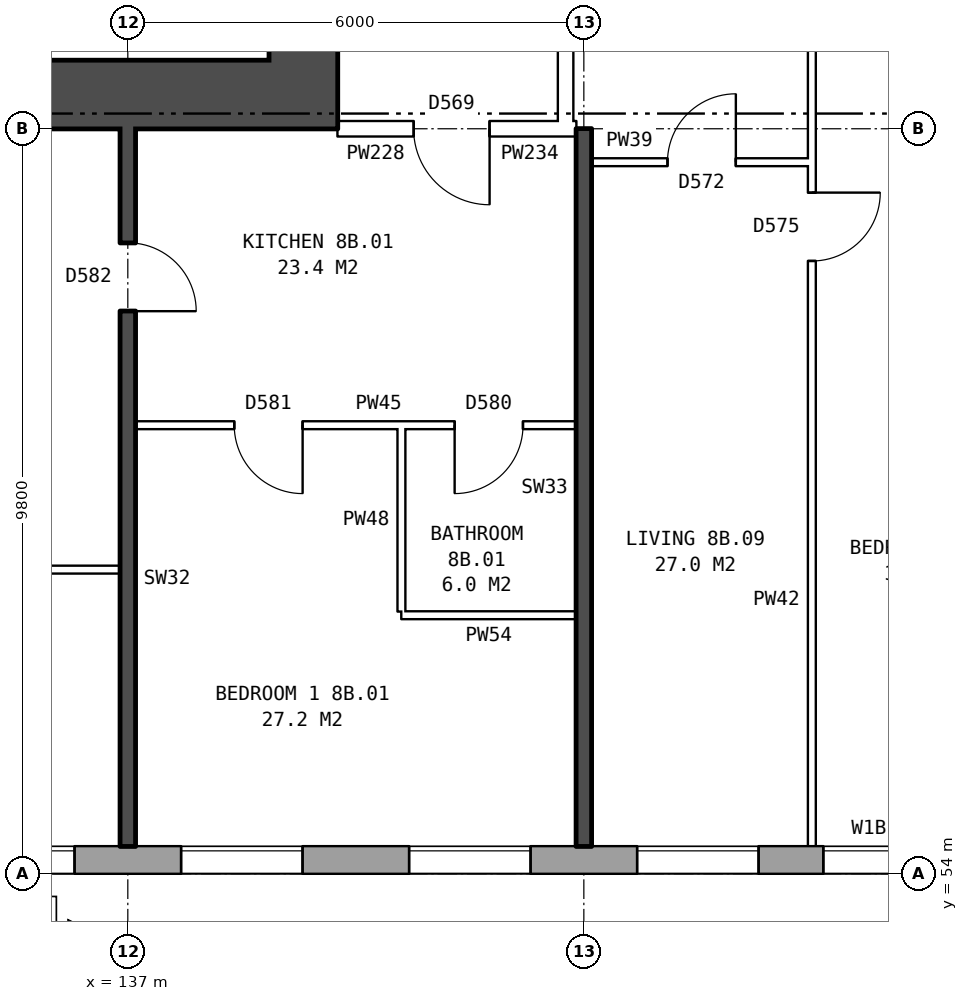
"""IFC4 building model, lengths in metres.
Left out: names, types, materials, properties, quantities, classifications, styles, units other than length and angle.
Written with IfcOpenShell. Run it as: python <this file> out.ifc"""

import sys

from ifc_helpers import new_model, si_unit, direction, frame, frame_2d, origin, place, context, subcontext, project, spatial, rectangle, extrude, element, fill, save


model = new_model("IFC4")
c1 = context("Model", 3, precision=1e-05, world=origin(), true_north=direction((0.0, 1.0)))
c2 = subcontext(c1, "Body", "Model", "MODEL_VIEW")
j1 = project(units=[si_unit("LENGTHUNIT", "METRE"), si_unit("PLANEANGLEUNIT", "RADIAN")], contexts=[c1])
p1 = place(None, origin())
s1 = spatial("IfcSite", under=j1, at=p1, CompositionType="ELEMENT")
p2 = place(p1, origin())
s2 = spatial("IfcBuilding", under=s1, at=p2, CompositionType="ELEMENT")
p3 = place(p2, frame((0.0, 0.0, 31.9)))
s3 = spatial("IfcBuildingStorey", under=s2, at=p3, CompositionType="ELEMENT", Elevation=31.9)
p4 = place(p3, frame((134.075, 54.18, 0.0), z_axis=(0.0, 0.0, 1.0), x_axis=(1.0, 0.0, 0.0)))
e1 = element("IfcWall", 1, at=p4, inside=s3, PredefinedType="STANDARD", context=c2, shape_type="SweptSolid", body=[
    extrude(rectangle(XDim=40.601, YDim=0.36, at=frame_2d((20.3, 0.0))), origin(), (0.0, 0.0, 1.0), 2.85),
])
p5 = place(p4, frame((0.625, 0.0, 0.8)))
e2 = element("IfcOpeningElement", 2, at=p5, cuts=e1, PredefinedType="OPENING", context=c2, shape_type="SweptSolid", body=[
    extrude(rectangle(XDim=1.6, YDim=1.8, at=frame_2d((0.8, 0.9))), frame((0.0, 0.19, 0.0), z_axis=(0.0, -1.0, 0.0), x_axis=(1.0, 0.0, 0.0)), (0.0, 0.0, 1.0), 0.38),
])
p6 = place(p4, frame((3.625, 0.0, 0.8)))
e3 = element("IfcOpeningElement", 3, at=p6, cuts=e1, PredefinedType="OPENING", context=c2, shape_type="SweptSolid", body=[
    extrude(rectangle(XDim=1.6, YDim=1.8, at=frame_2d((0.8, 0.9))), frame((0.0, 0.19, 0.0), z_axis=(0.0, -1.0, 0.0), x_axis=(1.0, 0.0, 0.0)), (0.0, 0.0, 1.0), 0.38),
])
p7 = place(p4, frame((6.625, 0.0, 0.8)))
e4 = element("IfcOpeningElement", 4, at=p7, cuts=e1, PredefinedType="OPENING", context=c2, shape_type="SweptSolid", body=[
    extrude(rectangle(XDim=1.6, YDim=1.8, at=frame_2d((0.8, 0.9))), frame((0.0, 0.19, 0.0), z_axis=(0.0, -1.0, 0.0), x_axis=(1.0, 0.0, 0.0)), (0.0, 0.0, 1.0), 0.38),
])
p8 = place(p4, frame((9.625, 0.0, 0.8)))
e5 = element("IfcOpeningElement", 5, at=p8, cuts=e1, PredefinedType="OPENING", context=c2, shape_type="SweptSolid", body=[
    extrude(rectangle(XDim=1.6, YDim=1.8, at=frame_2d((0.8, 0.9))), frame((0.0, 0.19, 0.0), z_axis=(0.0, -1.0, 0.0), x_axis=(1.0, 0.0, 0.0)), (0.0, 0.0, 1.0), 0.38),
])
p9 = place(p4, frame((12.075, 0.0, 0.8)))
e6 = element("IfcOpeningElement", 6, at=p9, cuts=e1, PredefinedType="OPENING", context=c2, shape_type="SweptSolid", body=[
    extrude(rectangle(XDim=1.2, YDim=1.8, at=frame_2d((0.6, 0.9))), frame((0.0, 0.19, 0.0), z_axis=(0.0, -1.0, 0.0), x_axis=(1.0, 0.0, 0.0)), (0.0, 0.0, 1.0), 0.38),
])
p10 = place(p4, frame((15.575, 0.0, 0.65)))
e7 = element("IfcOpeningElement", 7, at=p10, cuts=e1, PredefinedType="OPENING", context=c2, shape_type="SweptSolid", body=[
    extrude(rectangle(XDim=0.8, YDim=0.9, at=frame_2d((0.4, 0.45))), frame((0.0, 0.19, 0.0), z_axis=(0.0, -1.0, 0.0), x_axis=(1.0, 0.0, 0.0)), (0.0, 0.0, 1.0), 0.38),
])
p11 = place(p4, frame((18.625, 0.0, 0.8)))
e8 = element("IfcOpeningElement", 8, at=p11, cuts=e1, PredefinedType="OPENING", context=c2, shape_type="SweptSolid", body=[
    extrude(rectangle(XDim=1.6, YDim=1.8, at=frame_2d((0.8, 0.9))), frame((0.0, 0.19, 0.0), z_axis=(0.0, -1.0, 0.0), x_axis=(1.0, 0.0, 0.0)), (0.0, 0.0, 1.0), 0.38),
])
p12 = place(p4, frame((21.625, 0.0, 0.8)))
e9 = element("IfcOpeningElement", 9, at=p12, cuts=e1, PredefinedType="OPENING", context=c2, shape_type="SweptSolid", body=[
    extrude(rectangle(XDim=1.6, YDim=1.8, at=frame_2d((0.8, 0.9))), frame((0.0, 0.19, 0.0), z_axis=(0.0, -1.0, 0.0), x_axis=(1.0, 0.0, 0.0)), (0.0, 0.0, 1.0), 0.38),
])
p13 = place(p4, frame((23.525, 0.0, 0.8)))
e10 = element("IfcOpeningElement", 10, at=p13, cuts=e1, PredefinedType="OPENING", context=c2, shape_type="SweptSolid", body=[
    extrude(rectangle(XDim=1.2, YDim=0.9, at=frame_2d((0.6, 0.45))), frame((0.0, 0.19, 0.0), z_axis=(0.0, -1.0, 0.0), x_axis=(1.0, 0.0, 0.0)), (0.0, 0.0, 1.0), 0.38),
])
p14 = place(p4, frame((27.625, 0.0, 0.8)))
e11 = element("IfcOpeningElement", 11, at=p14, cuts=e1, PredefinedType="OPENING", context=c2, shape_type="SweptSolid", body=[
    extrude(rectangle(XDim=1.6, YDim=1.8, at=frame_2d((0.8, 0.9))), frame((0.0, 0.19, 0.0), z_axis=(0.0, -1.0, 0.0), x_axis=(1.0, 0.0, 0.0)), (0.0, 0.0, 1.0), 0.38),
])
p15 = place(p4, frame((30.625, 0.0, 0.8)))
e12 = element("IfcOpeningElement", 12, at=p15, cuts=e1, PredefinedType="OPENING", context=c2, shape_type="SweptSolid", body=[
    extrude(rectangle(XDim=1.6, YDim=1.8, at=frame_2d((0.8, 0.9))), frame((0.0, 0.19, 0.0), z_axis=(0.0, -1.0, 0.0), x_axis=(1.0, 0.0, 0.0)), (0.0, 0.0, 1.0), 0.38),
])
p16 = place(p4, frame((33.625, 0.0, 0.8)))
e13 = element("IfcOpeningElement", 13, at=p16, cuts=e1, PredefinedType="OPENING", context=c2, shape_type="SweptSolid", body=[
    extrude(rectangle(XDim=1.6, YDim=1.8, at=frame_2d((0.8, 0.9))), frame((0.0, 0.19, 0.0), z_axis=(0.0, -1.0, 0.0), x_axis=(1.0, 0.0, 0.0)), (0.0, 0.0, 1.0), 0.38),
])
p17 = place(p4, frame((36.625, 0.0, 0.8)))
e14 = element("IfcOpeningElement", 14, at=p17, cuts=e1, PredefinedType="OPENING", context=c2, shape_type="SweptSolid", body=[
    extrude(rectangle(XDim=1.6, YDim=1.8, at=frame_2d((0.8, 0.9))), frame((0.0, 0.19, 0.0), z_axis=(0.0, -1.0, 0.0), x_axis=(1.0, 0.0, 0.0)), (0.0, 0.0, 1.0), 0.38),
])
p18 = place(p4, frame((13.575, 0.0, 1.4)))
e15 = element("IfcOpeningElement", 15, at=p18, cuts=e1, PredefinedType="OPENING", context=c2, shape_type="SweptSolid", body=[
    extrude(rectangle(XDim=0.6, YDim=1.2, at=frame_2d((0.3, 0.6))), frame((0.0, 0.19, 0.0), z_axis=(0.0, -1.0, 0.0), x_axis=(1.0, 0.0, 0.0)), (0.0, 0.0, 1.0), 0.38),
])
p19 = place(p4, frame((16.725, 0.0, 0.65)))
e16 = element("IfcOpeningElement", 16, at=p19, cuts=e1, PredefinedType="OPENING", context=c2, shape_type="SweptSolid", body=[
    extrude(rectangle(XDim=1.0, YDim=1.8, at=frame_2d((0.5, 0.9))), frame((0.0, 0.19, 0.0), z_axis=(0.0, -1.0, 0.0), x_axis=(1.0, 0.0, 0.0)), (0.0, 0.0, 1.0), 0.38),
])
p20 = place(p4, frame((26.075, 0.0, 1.7)))
e17 = element("IfcOpeningElement", 17, at=p20, cuts=e1, PredefinedType="OPENING", context=c2, shape_type="SweptSolid", body=[
    extrude(rectangle(XDim=0.6, YDim=0.9, at=frame_2d((0.3, 0.45))), frame((0.0, 0.19, 0.0), z_axis=(0.0, -1.0, 0.0), x_axis=(1.0, 0.0, 0.0)), (0.0, 0.0, 1.0), 0.38),
])
p21 = place(p3, frame((139.31, 64.7, 0.0), z_axis=(0.0, 0.0, 1.0), x_axis=(0.0, 1.0, 0.0)))
e18 = element("IfcWall", 18, at=p21, inside=s3, PredefinedType="SHEAR", context=c2, shape_type="SweptSolid", body=[
    extrude(rectangle(XDim=10.6, YDim=0.9, at=frame_2d((5.3, 0.0))), origin(), (0.0, 0.0, 1.0), 2.85),
])
p22 = place(p21, frame((0.425, 0.0, 0.0)))
e19 = element("IfcOpeningElement", 19, at=p22, cuts=e18, PredefinedType="OPENING", context=c2, shape_type="SweptSolid", body=[
    extrude(rectangle(XDim=1.1, YDim=2.1, at=frame_2d((0.55, 1.05))), frame((0.0, 0.46, 0.0), z_axis=(0.0, -1.0, 0.0), x_axis=(1.0, 0.0, 0.0)), (0.0, 0.0, 1.0), 0.92),
])
p23 = place(p21, frame((9.0, 0.0, 0.0)))
e20 = element("IfcOpeningElement", 20, at=p23, cuts=e18, PredefinedType="OPENING", context=c2, shape_type="SweptSolid", body=[
    extrude(rectangle(XDim=1.1, YDim=2.1, at=frame_2d((0.55, 1.05))), frame((0.0, 0.46, 0.0), z_axis=(0.0, -1.0, 0.0), x_axis=(1.0, 0.0, 0.0)), (0.0, 0.0, 1.0), 0.92),
])
p24 = place(p21, frame((7.225, 0.0, 0.0)))
e21 = element("IfcOpeningElement", 21, at=p24, cuts=e18, PredefinedType="OPENING", context=c2, shape_type="SweptSolid", body=[
    extrude(rectangle(XDim=0.85, YDim=2.1, at=frame_2d((0.425, 1.05))), frame((0.0, 0.46, 0.0), z_axis=(0.0, -1.0, 0.0), x_axis=(1.0, 0.0, 0.0)), (0.0, 0.0, 1.0), 0.92),
])
p25 = place(p3, frame((139.76, 64.25, 0.0), z_axis=(0.0, 0.0, 1.0), x_axis=(-1.0, 0.0, 0.0)))
e22 = element("IfcWall", 22, at=p25, inside=s3, PredefinedType="SHEAR", context=c2, shape_type="SweptSolid", body=[
    extrude(rectangle(XDim=8.4, YDim=0.9, at=frame_2d((4.2, 0.0))), origin(), (0.0, 0.0, 1.0), 2.85),
])
p26 = place(p3, frame((142.76, 63.9, 0.0), z_axis=(0.0, 0.0, 1.0), x_axis=(0.0, 1.0, 0.0)))
e23 = element("IfcWall", 23, at=p26, inside=s3, PredefinedType="PARTITIONING", context=c2, shape_type="SweptSolid", body=[
    extrude(rectangle(XDim=12.2, YDim=0.2, at=frame_2d((6.1, 0.0))), origin(), (0.0, 0.0, 1.0), 2.85),
])
p27 = place(p26, frame((5.1, 0.0, 0.0)))
e24 = element("IfcOpeningElement", 24, at=p27, cuts=e23, PredefinedType="OPENING", context=c2, shape_type="SweptSolid", body=[
    extrude(rectangle(XDim=2.0, YDim=2.1, at=frame_2d((1.0, 1.05))), frame((0.0, 0.11, 0.0), z_axis=(0.0, -1.0, 0.0), x_axis=(1.0, 0.0, 0.0)), (0.0, 0.0, 1.0), 0.22),
])
p28 = place(p3, frame((140.6, 57.4, 0.0), z_axis=(0.0, 0.0, 1.0), x_axis=(1.0, 0.0, 0.0)))
e25 = element("IfcWall", 25, at=p28, inside=s3, PredefinedType="PARTITIONING", context=c2, shape_type="SweptSolid", body=[
    extrude(rectangle(XDim=2.3, YDim=0.1, at=frame_2d((1.15, 0.0))), origin(), (0.0, 0.0, 1.0), 2.85),
])
p29 = place(p3, frame((131.36, 58.0, 0.0), z_axis=(0.0, 0.0, 1.0), x_axis=(1.0, 0.0, 0.0)))
e26 = element("IfcWall", 26, at=p29, inside=s3, PredefinedType="PARTITIONING", context=c2, shape_type="SweptSolid", body=[
    extrude(rectangle(XDim=5.54, YDim=0.1, at=frame_2d((2.77, 0.0))), origin(), (0.0, 0.0, 1.0), 2.85),
])
p30 = place(p29, frame((2.32, 0.0, 0.0)))
e27 = element("IfcOpeningElement", 27, at=p30, cuts=e26, PredefinedType="OPENING", context=c2, shape_type="SweptSolid", body=[
    extrude(rectangle(XDim=0.9, YDim=2.1, at=frame_2d((0.45, 1.05))), frame((0.0, 0.06, 0.0), z_axis=(0.0, -1.0, 0.0), x_axis=(1.0, 0.0, 0.0)), (0.0, 0.0, 1.0), 0.12),
])
p31 = place(p3, frame((137.1, 59.9, 0.0), z_axis=(0.0, 0.0, 1.0), x_axis=(1.0, 0.0, 0.0)))
e28 = element("IfcWall", 28, at=p31, inside=s3, PredefinedType="PARTITIONING", context=c2, shape_type="SweptSolid", body=[
    extrude(rectangle(XDim=5.8, YDim=0.1, at=frame_2d((2.9, 0.0))), origin(), (0.0, 0.0, 1.0), 2.85),
])
p32 = place(p31, frame((1.3, 0.0, 0.0)))
e29 = element("IfcOpeningElement", 29, at=p32, cuts=e28, PredefinedType="OPENING", context=c2, shape_type="SweptSolid", body=[
    extrude(rectangle(XDim=0.9, YDim=2.1, at=frame_2d((0.45, 1.05))), frame((0.0, 0.06, 0.0), z_axis=(0.0, -1.0, 0.0), x_axis=(1.0, 0.0, 0.0)), (0.0, 0.0, 1.0), 0.12),
])
p33 = place(p31, frame((4.2, 0.0, 0.0)))
e30 = element("IfcOpeningElement", 30, at=p33, cuts=e28, PredefinedType="OPENING", context=c2, shape_type="SweptSolid", body=[
    extrude(rectangle(XDim=0.9, YDim=2.1, at=frame_2d((0.45, 1.05))), frame((0.0, 0.06, 0.0), z_axis=(0.0, -1.0, 0.0), x_axis=(1.0, 0.0, 0.0)), (0.0, 0.0, 1.0), 0.12),
])
p34 = place(p3, frame((143.1, 63.36, 0.0), z_axis=(0.0, 0.0, 1.0), x_axis=(1.0, 0.0, 0.0)))
e31 = element("IfcWall", 31, at=p34, inside=s3, PredefinedType="PARTITIONING", context=c2, shape_type="SweptSolid", body=[
    extrude(rectangle(XDim=2.9, YDim=0.1, at=frame_2d((1.45, 0.0))), origin(), (0.0, 0.0, 1.0), 2.85),
])
p35 = place(p34, frame((1.0, 0.0, 0.0)))
e32 = element("IfcOpeningElement", 32, at=p35, cuts=e31, PredefinedType="OPENING", context=c2, shape_type="SweptSolid", body=[
    extrude(rectangle(XDim=0.9, YDim=2.1, at=frame_2d((0.45, 1.05))), frame((0.0, 0.06, 0.0), z_axis=(0.0, -1.0, 0.0), x_axis=(1.0, 0.0, 0.0)), (0.0, 0.0, 1.0), 0.12),
])
p36 = place(p3, frame((139.76, 63.8, 0.0), z_axis=(0.0, 0.0, 1.0), x_axis=(1.0, 0.0, 0.0)))
e33 = element("IfcWall", 33, at=p36, inside=s3, PredefinedType="PARTITIONING", context=c2, shape_type="SweptSolid", body=[
    extrude(rectangle(XDim=3.0, YDim=0.2, at=frame_2d((1.5, 0.0))), origin(), (0.0, 0.0, 1.0), 2.85),
])
p37 = place(p36, frame((1.0, 0.0, 0.0)))
e34 = element("IfcOpeningElement", 34, at=p37, cuts=e33, PredefinedType="OPENING", context=c2, shape_type="SweptSolid", body=[
    extrude(rectangle(XDim=1.0, YDim=2.1, at=frame_2d((0.5, 1.05))), frame((0.0, 0.11, 0.0), z_axis=(0.0, -1.0, 0.0), x_axis=(1.0, 0.0, 0.0)), (0.0, 0.0, 1.0), 0.22),
])
p38 = place(p3, frame((142.76, 63.8, 0.0), z_axis=(0.0, 0.0, 1.0), x_axis=(1.0, 0.0, 0.0)))
e35 = element("IfcWall", 35, at=p38, inside=s3, PredefinedType="PARTITIONING", context=c2, shape_type="SweptSolid", body=[
    extrude(rectangle(XDim=0.14, YDim=0.2, at=frame_2d((0.07, 0.0))), origin(), (0.0, 0.0, 1.0), 2.85),
])
p39 = place(p3, frame((137.0, 54.36, 0.0), z_axis=(0.0, 0.0, 1.0), x_axis=(0.0, 1.0, 0.0)))
e36 = element("IfcWall", 36, at=p39, inside=s3, PredefinedType="SOLIDWALL", context=c2, shape_type="SweptSolid", body=[
    extrude(rectangle(XDim=9.44, YDim=0.2, at=frame_2d((4.72, 0.0))), origin(), (0.0, 0.0, 1.0), 2.85),
])
p40 = place(p39, frame((7.04, 0.0, 0.0)))
e37 = element("IfcOpeningElement", 37, at=p40, cuts=e36, PredefinedType="OPENING", context=c2, shape_type="SweptSolid", body=[
    extrude(rectangle(XDim=0.9, YDim=2.1, at=frame_2d((0.45, 1.05))), frame((0.0, 0.11, 0.0), z_axis=(0.0, -1.0, 0.0), x_axis=(1.0, 0.0, 0.0)), (0.0, 0.0, 1.0), 0.22),
])
p41 = place(p3, frame((140.6, 57.45, 0.0), z_axis=(0.0, 0.0, 1.0), x_axis=(0.0, 1.0, 0.0)))
e38 = element("IfcWall", 38, at=p41, inside=s3, PredefinedType="PARTITIONING", context=c2, shape_type="SweptSolid", body=[
    extrude(rectangle(XDim=2.4, YDim=0.1, at=frame_2d((1.2, 0.0))), origin(), (0.0, 0.0, 1.0), 2.85),
])
p42 = place(p3, frame((143.0, 54.36, 0.0), z_axis=(0.0, 0.0, 1.0), x_axis=(0.0, 1.0, 0.0)))
e39 = element("IfcWall", 39, at=p42, inside=s3, PredefinedType="SOLIDWALL", context=c2, shape_type="SweptSolid", body=[
    extrude(rectangle(XDim=9.44, YDim=0.2, at=frame_2d((4.72, 0.0))), origin(), (0.0, 0.0, 1.0), 2.85),
])
p43 = place(p3, frame((146.0, 54.36, 0.0), z_axis=(0.0, 0.0, 1.0), x_axis=(0.0, 1.0, 0.0)))
e40 = element("IfcWall", 40, at=p43, inside=s3, PredefinedType="PARTITIONING", context=c2, shape_type="SweptSolid", body=[
    extrude(rectangle(XDim=14.34, YDim=0.1, at=frame_2d((7.17, 0.0))), origin(), (0.0, 0.0, 1.0), 2.85),
])
p44 = place(p43, frame((7.7, 0.0, 0.0)))
e41 = element("IfcOpeningElement", 41, at=p44, cuts=e40, PredefinedType="OPENING", context=c2, shape_type="SweptSolid", body=[
    extrude(rectangle(XDim=0.9, YDim=2.1, at=frame_2d((0.45, 1.05))), frame((0.0, 0.06, 0.0), z_axis=(0.0, -1.0, 0.0), x_axis=(1.0, 0.0, 0.0)), (0.0, 0.0, 1.0), 0.12),
])
p45 = place(p43, frame((13.04, 0.0, 0.0)))
e42 = element("IfcOpeningElement", 42, at=p45, cuts=e40, PredefinedType="OPENING", context=c2, shape_type="SweptSolid", body=[
    extrude(rectangle(XDim=0.9, YDim=2.1, at=frame_2d((0.45, 1.05))), frame((0.0, 0.06, 0.0), z_axis=(0.0, -1.0, 0.0), x_axis=(1.0, 0.0, 0.0)), (0.0, 0.0, 1.0), 0.12),
])
p46 = place(p5, origin())
e43 = element("IfcWindow", 43, at=p46, inside=s3, PartitioningType="SINGLE_PANEL", PredefinedType="WINDOW", context=c2, shape_type="SweptSolid", body=[
    extrude(rectangle(XDim=1.6, YDim=1.8, at=frame_2d((0.8, 0.9))), frame((0.0, 0.15, 0.0), z_axis=(0.0, -1.0, 0.0), x_axis=(1.0, 0.0, 0.0)), (0.0, 0.0, 1.0), 0.06),
])
fill(e2, e43)
p47 = place(p6, origin())
e44 = element("IfcWindow", 44, at=p47, inside=s3, PartitioningType="SINGLE_PANEL", PredefinedType="WINDOW", context=c2, shape_type="SweptSolid", body=[
    extrude(rectangle(XDim=1.6, YDim=1.8, at=frame_2d((0.8, 0.9))), frame((0.0, 0.15, 0.0), z_axis=(0.0, -1.0, 0.0), x_axis=(1.0, 0.0, 0.0)), (0.0, 0.0, 1.0), 0.06),
])
fill(e3, e44)
p48 = place(p7, origin())
e45 = element("IfcWindow", 45, at=p48, inside=s3, PartitioningType="SINGLE_PANEL", PredefinedType="WINDOW", context=c2, shape_type="SweptSolid", body=[
    extrude(rectangle(XDim=1.6, YDim=1.8, at=frame_2d((0.8, 0.9))), frame((0.0, 0.15, 0.0), z_axis=(0.0, -1.0, 0.0), x_axis=(1.0, 0.0, 0.0)), (0.0, 0.0, 1.0), 0.06),
])
fill(e4, e45)
p49 = place(p8, origin())
e46 = element("IfcWindow", 46, at=p49, inside=s3, PartitioningType="SINGLE_PANEL", PredefinedType="WINDOW", context=c2, shape_type="SweptSolid", body=[
    extrude(rectangle(XDim=1.6, YDim=1.8, at=frame_2d((0.8, 0.9))), frame((0.0, 0.15, 0.0), z_axis=(0.0, -1.0, 0.0), x_axis=(1.0, 0.0, 0.0)), (0.0, 0.0, 1.0), 0.06),
])
fill(e5, e46)
p50 = place(p9, origin())
e47 = element("IfcWindow", 47, at=p50, inside=s3, PartitioningType="SINGLE_PANEL", PredefinedType="WINDOW", context=c2, shape_type="SweptSolid", body=[
    extrude(rectangle(XDim=1.2, YDim=1.8, at=frame_2d((0.6, 0.9))), frame((0.0, 0.15, 0.0), z_axis=(0.0, -1.0, 0.0), x_axis=(1.0, 0.0, 0.0)), (0.0, 0.0, 1.0), 0.06),
])
fill(e6, e47)
p51 = place(p32, frame((0.9, 0.0, 0.0), z_axis=(0.0, 0.0, 1.0), x_axis=(-1.0, 0.0, 0.0)))
e48 = element("IfcDoor", 48, at=p51, inside=s3, OperationType="SINGLE_SWING_LEFT", PredefinedType="DOOR", context=c2, shape_type="SweptSolid", body=[
    extrude(rectangle(XDim=0.9, YDim=2.1, at=frame_2d((0.45, 1.05))), frame((0.0, 0.025, 0.0), z_axis=(0.0, -1.0, 0.0), x_axis=(1.0, 0.0, 0.0)), (0.0, 0.0, 1.0), 0.05),
])
fill(e29, e48)
p52 = place(p37, frame((1.0, 0.0, 0.0), z_axis=(0.0, 0.0, 1.0), x_axis=(-1.0, 0.0, 0.0)))
e49 = element("IfcDoor", 49, at=p52, inside=s3, OperationType="SINGLE_SWING_LEFT", PredefinedType="DOOR", context=c2, shape_type="SweptSolid", body=[
    extrude(rectangle(XDim=1.0, YDim=2.1, at=frame_2d((0.5, 1.05))), frame((0.0, 0.025, 0.0), z_axis=(0.0, -1.0, 0.0), x_axis=(1.0, 0.0, 0.0)), (0.0, 0.0, 1.0), 0.05),
])
fill(e34, e49)
p53 = place(p40, frame((0.9, 0.0, 0.0), z_axis=(0.0, 0.0, 1.0), x_axis=(-1.0, 0.0, 0.0)))
e50 = element("IfcDoor", 50, at=p53, inside=s3, OperationType="SINGLE_SWING_RIGHT", PredefinedType="DOOR", context=c2, shape_type="SweptSolid", body=[
    extrude(rectangle(XDim=0.9, YDim=2.1, at=frame_2d((0.45, 1.05))), frame((0.0, 0.025, 0.0), z_axis=(0.0, -1.0, 0.0), x_axis=(1.0, 0.0, 0.0)), (0.0, 0.0, 1.0), 0.05),
])
fill(e37, e50)
p54 = place(p33, frame((0.9, 0.0, 0.0), z_axis=(0.0, 0.0, 1.0), x_axis=(-1.0, 0.0, 0.0)))
e51 = element("IfcDoor", 51, at=p54, inside=s3, OperationType="SINGLE_SWING_RIGHT", PredefinedType="DOOR", context=c2, shape_type="SweptSolid", body=[
    extrude(rectangle(XDim=0.9, YDim=2.1, at=frame_2d((0.45, 1.05))), frame((0.0, 0.025, 0.0), z_axis=(0.0, -1.0, 0.0), x_axis=(1.0, 0.0, 0.0)), (0.0, 0.0, 1.0), 0.05),
])
fill(e30, e51)
p55 = place(p44, frame((0.9, 0.0, 0.0), z_axis=(0.0, 0.0, 1.0), x_axis=(-1.0, 0.0, 0.0)))
e52 = element("IfcDoor", 52, at=p55, inside=s3, OperationType="SINGLE_SWING_LEFT", PredefinedType="DOOR", context=c2, shape_type="SweptSolid", body=[
    extrude(rectangle(XDim=0.9, YDim=2.1, at=frame_2d((0.45, 1.05))), frame((0.0, 0.025, 0.0), z_axis=(0.0, -1.0, 0.0), x_axis=(1.0, 0.0, 0.0)), (0.0, 0.0, 1.0), 0.05),
])
fill(e41, e52)
p56 = place(p35, origin())
e53 = element("IfcDoor", 53, at=p56, inside=s3, OperationType="SINGLE_SWING_RIGHT", PredefinedType="DOOR", context=c2, shape_type="SweptSolid", body=[
    extrude(rectangle(XDim=0.9, YDim=2.1, at=frame_2d((0.45, 1.05))), frame((0.0, 0.025, 0.0), z_axis=(0.0, -1.0, 0.0), x_axis=(1.0, 0.0, 0.0)), (0.0, 0.0, 1.0), 0.05),
])
fill(e32, e53)
save(model, sys.argv[1])
